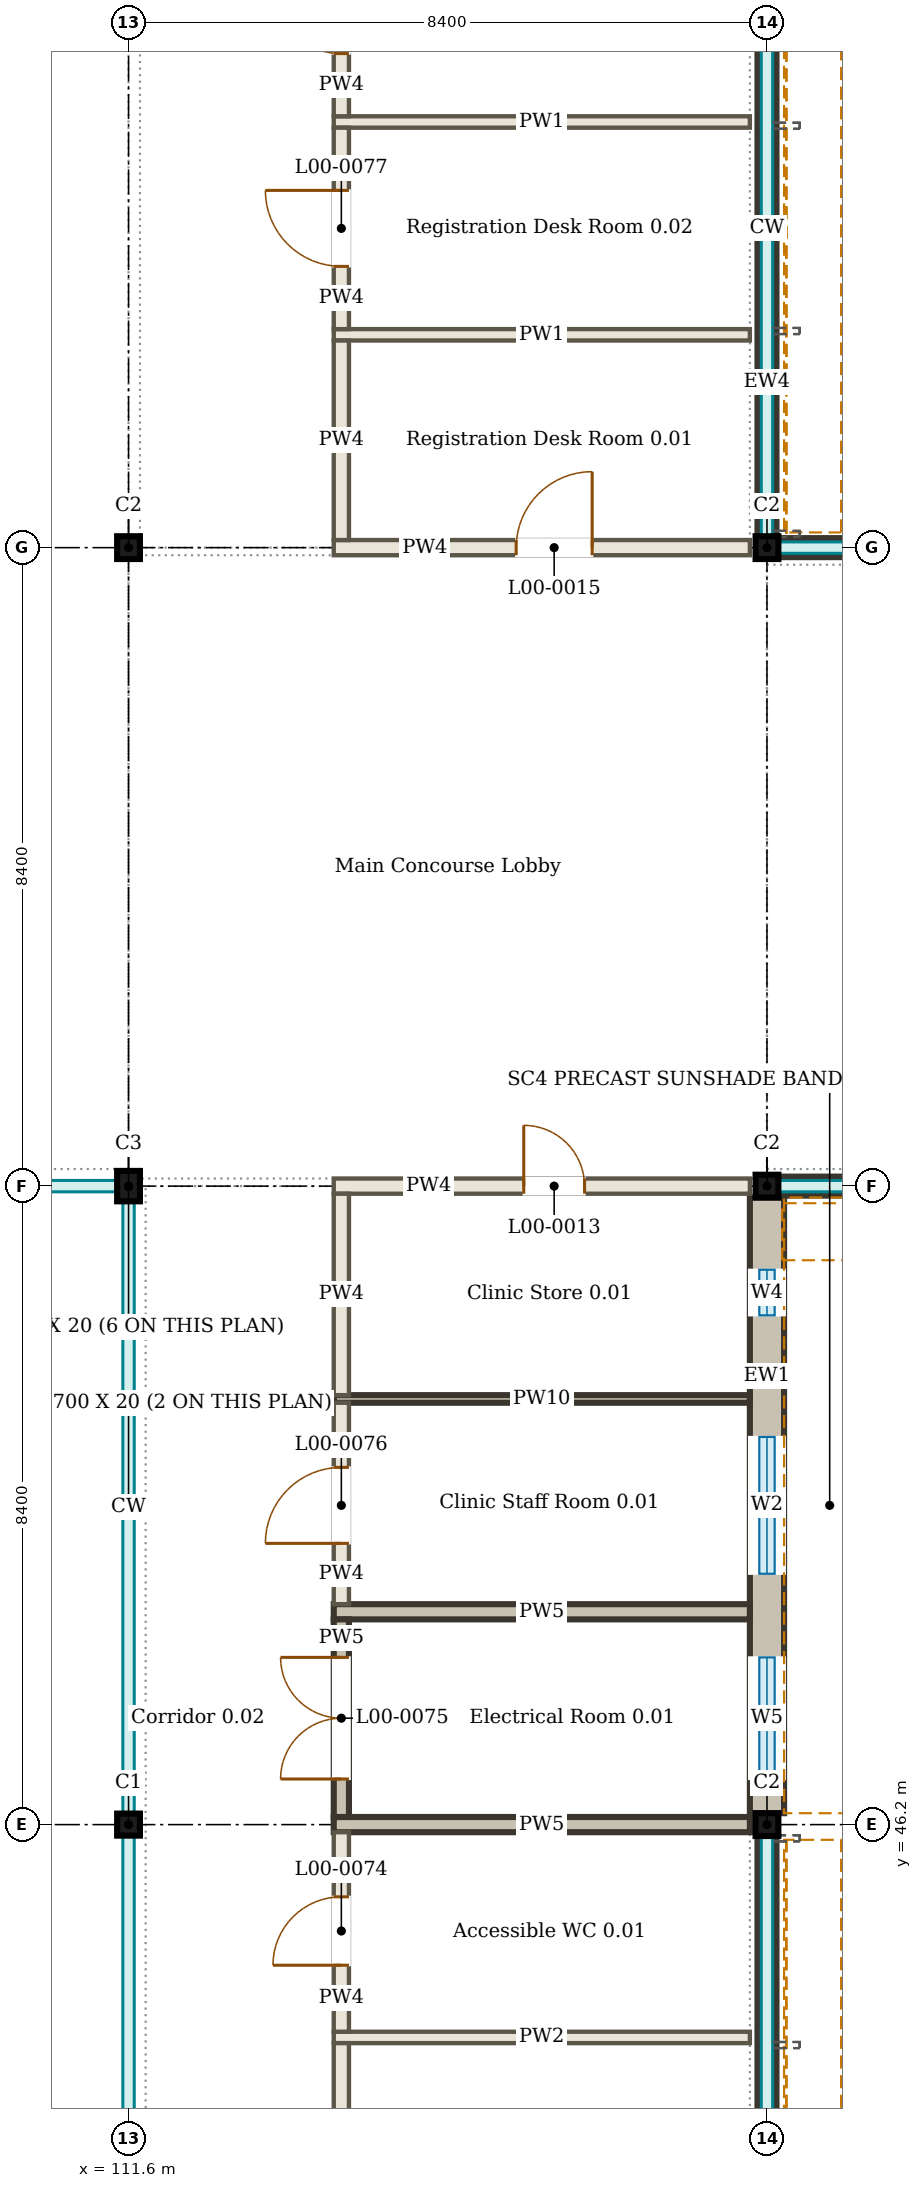
"""IFC4 building model, lengths in metres.
Left out: names, types, materials, properties, quantities, classifications, styles, units other than length and angle.
Written with IfcOpenShell. Run it as: python <this file> out.ifc"""

import sys

from ifc_helpers import new_model, si_unit, direction, frame, frame_2d, origin, origin_2d, place, context, subcontext, project, spatial, rectangle, i_section, extrude, element, fill, save


model = new_model("IFC4")
c1 = context("Model", 3, precision=1e-05, world=origin(), true_north=direction((0.0, 1.0)))
c2 = subcontext(c1, "Body", "Model", "MODEL_VIEW")
j1 = project(units=[si_unit("LENGTHUNIT", "METRE"), si_unit("PLANEANGLEUNIT", "RADIAN")], contexts=[c1])
p1 = place(None, origin())
s1 = spatial("IfcSite", under=j1, at=p1, CompositionType="ELEMENT")
p2 = place(p1, origin())
s2 = spatial("IfcBuilding", under=s1, at=p2, CompositionType="ELEMENT")
p3 = place(p2, origin())
s3 = spatial("IfcBuildingStorey", under=s2, at=p3, CompositionType="ELEMENT", Elevation=0.0)
p4 = place(p3, frame((111.6, 46.2, 0.0), z_axis=(0.0, 0.0, 1.0), x_axis=(1.0, 0.0, 0.0)))
e1 = element("IfcColumn", 1, at=p4, inside=s3, PredefinedType="COLUMN", context=c2, shape_type="SweptSolid", body=[
    extrude(i_section(OverallWidth=0.3, OverallDepth=0.29, WebThickness=0.009, FlangeThickness=0.014, FilletRadius=0.027, at=origin_2d()), origin(), (0.0, 0.0, 1.0), 4.5),
])
p5 = place(p3, frame((120.0, 46.2, 0.0), z_axis=(0.0, 0.0, 1.0), x_axis=(1.0, 0.0, 0.0)))
e2 = element("IfcColumn", 2, at=p5, inside=s3, PredefinedType="COLUMN", context=c2, shape_type="SweptSolid", body=[
    extrude(i_section(OverallWidth=0.3, OverallDepth=0.3, WebThickness=0.011, FlangeThickness=0.019, FilletRadius=0.027, at=origin_2d()), origin(), (0.0, 0.0, 1.0), 4.5),
])
p6 = place(p3, frame((111.6, 54.6, 0.0), z_axis=(0.0, 0.0, 1.0), x_axis=(1.0, 0.0, 0.0)))
e3 = element("IfcColumn", 3, at=p6, inside=s3, PredefinedType="COLUMN", context=c2, shape_type="SweptSolid", body=[
    extrude(i_section(OverallWidth=0.3, OverallDepth=0.4, WebThickness=0.013, FlangeThickness=0.024, FilletRadius=0.027, at=origin_2d()), origin(), (0.0, 0.0, 1.0), 4.5),
])
for number, where, z_axis, x_axis in (
    (4, (120.0, 54.6, 0.0), (0.0, 0.0, 1.0), (1.0, 0.0, 0.0)),
    (5, (111.6, 63.0, 0.0), (0.0, 0.0, 1.0), (1.0, 0.0, 0.0)),
    (6, (120.0, 63.0, 0.0), (0.0, 0.0, 1.0), (1.0, 0.0, 0.0)),
):
    element("IfcColumn", number, at=place(p3, frame(where, z_axis=z_axis, x_axis=x_axis)), inside=s3, PredefinedType="COLUMN", context=c2, shape_type="SweptSolid", body=[
        extrude(i_section(OverallWidth=0.3, OverallDepth=0.3, WebThickness=0.011, FlangeThickness=0.019, FilletRadius=0.027, at=origin_2d()), origin(), (0.0, 0.0, 1.0), 4.5),
    ])
p7 = place(p3, frame((120.0, 37.8, 0.0), z_axis=(0.0, 0.0, 1.0), x_axis=(0.0, 1.0, 0.0)))
e7 = element("IfcWall", 7, at=p7, inside=s3, PredefinedType="SOLIDWALL", context=c2, shape_type="SweptSolid", body=[
    extrude(rectangle(XDim=8.25, YDim=0.25, at=frame_2d((4.125, 0.0))), origin(), (0.0, 0.0, 1.0), 0.45),
])
p8 = place(p3, frame((120.16, 37.8, 3.82), z_axis=(0.0, 0.0, 1.0), x_axis=(0.0, 1.0, 0.0)))
e8 = element("IfcWall", 8, at=p8, inside=s3, PredefinedType="SOLIDWALL", context=c2, shape_type="SweptSolid", body=[
    extrude(rectangle(XDim=8.25, YDim=0.13, at=frame_2d((4.125, 0.0))), origin(), (0.0, 0.0, 1.0), 0.68),
])
p9 = place(p3, frame((120.0, 46.35, 0.0), z_axis=(0.0, 0.0, 1.0), x_axis=(0.0, 1.0, 0.0)))
e9 = element("IfcWall", 9, at=p9, inside=s3, PredefinedType="SOLIDWALL", context=c2, shape_type="SweptSolid", body=[
    extrude(rectangle(XDim=8.1, YDim=0.45, at=frame_2d((4.05, 0.0))), origin(), (0.0, 0.0, 1.0), 3.8),
])
p10 = place(p9, frame((0.45, 0.0, 0.9)))
e10 = element("IfcOpeningElement", 10, at=p10, cuts=e9, PredefinedType="OPENING", context=c2, shape_type="SweptSolid", body=[
    extrude(rectangle(XDim=1.6, YDim=1.2, at=frame_2d((0.8, 0.6))), frame((0.0, 0.235, 0.0), z_axis=(0.0, -1.0, 0.0), x_axis=(1.0, 0.0, 0.0)), (0.0, 0.0, 1.0), 0.47),
])
p11 = place(p9, frame((3.15, 0.0, 0.6)))
e11 = element("IfcOpeningElement", 11, at=p11, cuts=e9, PredefinedType="OPENING", context=c2, shape_type="SweptSolid", body=[
    extrude(rectangle(XDim=1.8, YDim=2.4, at=frame_2d((0.9, 1.2))), frame((0.0, 0.235, 0.0), z_axis=(0.0, -1.0, 0.0), x_axis=(1.0, 0.0, 0.0)), (0.0, 0.0, 1.0), 0.47),
])
p12 = place(p9, frame((6.55, 0.0, 2.1)))
e12 = element("IfcOpeningElement", 12, at=p12, cuts=e9, PredefinedType="OPENING", context=c2, shape_type="SweptSolid", body=[
    extrude(rectangle(XDim=0.6, YDim=1.2, at=frame_2d((0.3, 0.6))), frame((0.0, 0.235, 0.0), z_axis=(0.0, -1.0, 0.0), x_axis=(1.0, 0.0, 0.0)), (0.0, 0.0, 1.0), 0.47),
])
p13 = place(p3, frame((120.16, 46.35, 3.82), z_axis=(0.0, 0.0, 1.0), x_axis=(0.0, 1.0, 0.0)))
e13 = element("IfcWall", 13, at=p13, inside=s3, PredefinedType="SOLIDWALL", context=c2, shape_type="SweptSolid", body=[
    extrude(rectangle(XDim=8.1, YDim=0.13, at=frame_2d((4.05, 0.0))), origin(), (0.0, 0.0, 1.0), 0.68),
])
p14 = place(p3, frame((120.0, 63.15, 0.0), z_axis=(0.0, 0.0, 1.0), x_axis=(0.0, 1.0, 0.0)))
e14 = element("IfcWall", 14, at=p14, inside=s3, PredefinedType="SOLIDWALL", context=c2, shape_type="SweptSolid", body=[
    extrude(rectangle(XDim=8.1, YDim=0.25, at=frame_2d((4.05, 0.0))), origin(), (0.0, 0.0, 1.0), 0.45),
])
p15 = place(p3, frame((120.16, 63.15, 3.82), z_axis=(0.0, 0.0, 1.0), x_axis=(0.0, 1.0, 0.0)))
e15 = element("IfcWall", 15, at=p15, inside=s3, PredefinedType="SOLIDWALL", context=c2, shape_type="SweptSolid", body=[
    extrude(rectangle(XDim=8.1, YDim=0.13, at=frame_2d((4.05, 0.0))), origin(), (0.0, 0.0, 1.0), 0.68),
])
p16 = place(p3, frame((120.15, 63.0, 0.0), z_axis=(0.0, 0.0, 1.0), x_axis=(1.0, 0.0, 0.0)))
e16 = element("IfcWall", 16, at=p16, inside=s3, PredefinedType="SOLIDWALL", context=c2, shape_type="SweptSolid", body=[
    extrude(rectangle(XDim=8.1, YDim=0.25, at=frame_2d((4.05, 0.0))), origin(), (0.0, 0.0, 1.0), 0.45),
])
p17 = place(p3, frame((120.15, 63.16, 3.82), z_axis=(0.0, 0.0, 1.0), x_axis=(1.0, 0.0, 0.0)))
e17 = element("IfcWall", 17, at=p17, inside=s3, PredefinedType="SOLIDWALL", context=c2, shape_type="SweptSolid", body=[
    extrude(rectangle(XDim=8.1, YDim=0.13, at=frame_2d((4.05, 0.0))), origin(), (0.0, 0.0, 1.0), 0.68),
])
p18 = place(p3, frame((120.15, 54.6, 0.0), z_axis=(0.0, 0.0, 1.0), x_axis=(1.0, 0.0, 0.0)))
e18 = element("IfcWall", 18, at=p18, inside=s3, PredefinedType="SOLIDWALL", context=c2, shape_type="SweptSolid", body=[
    extrude(rectangle(XDim=8.1, YDim=0.25, at=frame_2d((4.05, 0.0))), origin(), (0.0, 0.0, 1.0), 0.45),
])
p19 = place(p3, frame((120.15, 54.44, 3.82), z_axis=(0.0, 0.0, 1.0), x_axis=(1.0, 0.0, 0.0)))
e19 = element("IfcWall", 19, at=p19, inside=s3, PredefinedType="SOLIDWALL", context=c2, shape_type="SweptSolid", body=[
    extrude(rectangle(XDim=8.1, YDim=0.13, at=frame_2d((4.05, 0.0))), origin(), (0.0, 0.0, 1.0), 0.68),
])
p20 = place(p3, frame((114.3, 43.4, 0.0), z_axis=(0.0, 0.0, 1.0), x_axis=(1.0, 0.0, 0.0)))
e20 = element("IfcWall", 20, at=p20, inside=s3, PredefinedType="PARTITIONING", context=c2, shape_type="SweptSolid", body=[
    extrude(rectangle(XDim=5.475, YDim=0.15, at=frame_2d((2.737, 0.0))), origin(), (0.0, 0.0, 1.0), 3.95),
])
p21 = place(p3, frame((114.3, 46.2, 0.0), z_axis=(0.0, 0.0, 1.0), x_axis=(1.0, 0.0, 0.0)))
e21 = element("IfcWall", 21, at=p21, inside=s3, PredefinedType="SOLIDWALL", context=c2, shape_type="SweptSolid", body=[
    extrude(rectangle(XDim=5.475, YDim=0.2, at=frame_2d((2.737, 0.0))), origin(), (0.0, 0.0, 1.0), 3.8),
])
p22 = place(p3, frame((114.3, 49.0, 0.0), z_axis=(0.0, 0.0, 1.0), x_axis=(1.0, 0.0, 0.0)))
e22 = element("IfcWall", 22, at=p22, inside=s3, PredefinedType="SOLIDWALL", context=c2, shape_type="SweptSolid", body=[
    extrude(rectangle(XDim=5.475, YDim=0.2, at=frame_2d((2.737, 0.0))), origin(), (0.0, 0.0, 1.0), 3.95),
])
p23 = place(p3, frame((114.3, 51.8, 0.0), z_axis=(0.0, 0.0, 1.0), x_axis=(1.0, 0.0, 0.0)))
e23 = element("IfcWall", 23, at=p23, inside=s3, PredefinedType="SOLIDWALL", context=c2, shape_type="SweptSolid", body=[
    extrude(rectangle(XDim=5.475, YDim=0.1, at=frame_2d((2.737, 0.0))), origin(), (0.0, 0.0, 1.0), 3.95),
])
p24 = place(p3, frame((114.3, 54.6, 0.0), z_axis=(0.0, 0.0, 1.0), x_axis=(1.0, 0.0, 0.0)))
e24 = element("IfcWall", 24, at=p24, inside=s3, PredefinedType="PARTITIONING", context=c2, shape_type="SweptSolid", body=[
    extrude(rectangle(XDim=5.475, YDim=0.2, at=frame_2d((2.737, 0.0))), origin(), (0.0, 0.0, 1.0), 3.8),
])
p25 = place(p24, frame((2.5, 0.0, 0.0)))
e25 = element("IfcOpeningElement", 25, at=p25, cuts=e24, PredefinedType="OPENING", context=c2, shape_type="SweptSolid", body=[
    extrude(rectangle(XDim=0.8, YDim=2.1, at=frame_2d((0.4, 1.05))), frame((0.0, 0.11, 0.0), z_axis=(0.0, -1.0, 0.0), x_axis=(1.0, 0.0, 0.0)), (0.0, 0.0, 1.0), 0.22),
])
p26 = place(p3, frame((114.3, 63.0, 0.0), z_axis=(0.0, 0.0, 1.0), x_axis=(1.0, 0.0, 0.0)))
e26 = element("IfcWall", 26, at=p26, inside=s3, PredefinedType="PARTITIONING", context=c2, shape_type="SweptSolid", body=[
    extrude(rectangle(XDim=5.475, YDim=0.2, at=frame_2d((2.737, 0.0))), origin(), (0.0, 0.0, 1.0), 3.8),
])
p27 = place(p26, frame((2.4, 0.0, 0.0)))
e27 = element("IfcOpeningElement", 27, at=p27, cuts=e26, PredefinedType="OPENING", context=c2, shape_type="SweptSolid", body=[
    extrude(rectangle(XDim=1.0, YDim=2.1, at=frame_2d((0.5, 1.05))), frame((0.0, 0.11, 0.0), z_axis=(0.0, -1.0, 0.0), x_axis=(1.0, 0.0, 0.0)), (0.0, 0.0, 1.0), 0.22),
])
for number, where, z_axis, x_axis in (
    (28, (114.3, 65.8, 0.0), (0.0, 0.0, 1.0), (1.0, 0.0, 0.0)),
    (29, (114.3, 68.6, 0.0), (0.0, 0.0, 1.0), (1.0, 0.0, 0.0)),
):
    element("IfcWall", number, at=place(p3, frame(where, z_axis=z_axis, x_axis=x_axis)), inside=s3, PredefinedType="PARTITIONING", context=c2, shape_type="SweptSolid", body=[
        extrude(rectangle(XDim=5.475, YDim=0.15, at=frame_2d((2.737, 0.0))), origin(), (0.0, 0.0, 1.0), 3.95),
    ])
p28 = place(p3, frame((114.4, 40.7, 0.0), z_axis=(0.0, 0.0, 1.0), x_axis=(0.0, 1.0, 0.0)))
e30 = element("IfcWall", 30, at=p28, inside=s3, PredefinedType="PARTITIONING", context=c2, shape_type="SweptSolid", body=[
    extrude(rectangle(XDim=2.625, YDim=0.2, at=frame_2d((1.312, 0.0))), origin(), (0.0, 0.0, 1.0), 3.95),
])
p29 = place(p3, frame((114.4, 43.475, 0.0), z_axis=(0.0, 0.0, 1.0), x_axis=(0.0, 1.0, 0.0)))
e31 = element("IfcWall", 31, at=p29, inside=s3, PredefinedType="PARTITIONING", context=c2, shape_type="SweptSolid", body=[
    extrude(rectangle(XDim=2.625, YDim=0.2, at=frame_2d((1.312, 0.0))), origin(), (0.0, 0.0, 1.0), 3.8),
])
p30 = place(p29, frame((0.875, 0.0, 0.0)))
e32 = element("IfcOpeningElement", 32, at=p30, cuts=e31, PredefinedType="OPENING", context=c2, shape_type="SweptSolid", body=[
    extrude(rectangle(XDim=0.9, YDim=2.1, at=frame_2d((0.45, 1.05))), frame((0.0, 0.11, 0.0), z_axis=(0.0, -1.0, 0.0), x_axis=(1.0, 0.0, 0.0)), (0.0, 0.0, 1.0), 0.22),
])
p31 = place(p3, frame((114.4, 46.3, 0.0), z_axis=(0.0, 0.0, 1.0), x_axis=(0.0, 1.0, 0.0)))
e33 = element("IfcWall", 33, at=p31, inside=s3, PredefinedType="SOLIDWALL", context=c2, shape_type="SweptSolid", body=[
    extrude(rectangle(XDim=2.6, YDim=0.2, at=frame_2d((1.3, 0.0))), origin(), (0.0, 0.0, 1.0), 3.8),
])
p32 = place(p31, frame((0.5, 0.0, 0.0)))
e34 = element("IfcOpeningElement", 34, at=p32, cuts=e33, PredefinedType="OPENING", context=c2, shape_type="SweptSolid", body=[
    extrude(rectangle(XDim=1.6, YDim=2.1, at=frame_2d((0.8, 1.05))), frame((0.0, 0.11, 0.0), z_axis=(0.0, -1.0, 0.0), x_axis=(1.0, 0.0, 0.0)), (0.0, 0.0, 1.0), 0.22),
])
p33 = place(p3, frame((114.4, 49.1, 0.0), z_axis=(0.0, 0.0, 1.0), x_axis=(0.0, 1.0, 0.0)))
e35 = element("IfcWall", 35, at=p33, inside=s3, PredefinedType="PARTITIONING", context=c2, shape_type="SweptSolid", body=[
    extrude(rectangle(XDim=2.65, YDim=0.2, at=frame_2d((1.325, 0.0))), origin(), (0.0, 0.0, 1.0), 3.95),
])
p34 = place(p33, frame((0.8, 0.0, 0.0)))
e36 = element("IfcOpeningElement", 36, at=p34, cuts=e35, PredefinedType="OPENING", context=c2, shape_type="SweptSolid", body=[
    extrude(rectangle(XDim=1.0, YDim=2.1, at=frame_2d((0.5, 1.05))), frame((0.0, 0.11, 0.0), z_axis=(0.0, -1.0, 0.0), x_axis=(1.0, 0.0, 0.0)), (0.0, 0.0, 1.0), 0.22),
])
p35 = place(p3, frame((114.4, 51.85, 0.0), z_axis=(0.0, 0.0, 1.0), x_axis=(0.0, 1.0, 0.0)))
e37 = element("IfcWall", 37, at=p35, inside=s3, PredefinedType="PARTITIONING", context=c2, shape_type="SweptSolid", body=[
    extrude(rectangle(XDim=2.65, YDim=0.2, at=frame_2d((1.325, 0.0))), origin(), (0.0, 0.0, 1.0), 3.8),
])
p36 = place(p3, frame((114.4, 63.1, 0.0), z_axis=(0.0, 0.0, 1.0), x_axis=(0.0, 1.0, 0.0)))
e38 = element("IfcWall", 38, at=p36, inside=s3, PredefinedType="PARTITIONING", context=c2, shape_type="SweptSolid", body=[
    extrude(rectangle(XDim=2.625, YDim=0.2, at=frame_2d((1.312, 0.0))), origin(), (0.0, 0.0, 1.0), 3.8),
])
p37 = place(p3, frame((114.4, 65.875, 0.0), z_axis=(0.0, 0.0, 1.0), x_axis=(0.0, 1.0, 0.0)))
e39 = element("IfcWall", 39, at=p37, inside=s3, PredefinedType="PARTITIONING", context=c2, shape_type="SweptSolid", body=[
    extrude(rectangle(XDim=2.65, YDim=0.2, at=frame_2d((1.325, 0.0))), origin(), (0.0, 0.0, 1.0), 3.95),
])
p38 = place(p37, frame((0.825, 0.0, 0.0)))
e40 = element("IfcOpeningElement", 40, at=p38, cuts=e39, PredefinedType="OPENING", context=c2, shape_type="SweptSolid", body=[
    extrude(rectangle(XDim=1.0, YDim=2.1, at=frame_2d((0.5, 1.05))), frame((0.0, 0.11, 0.0), z_axis=(0.0, -1.0, 0.0), x_axis=(1.0, 0.0, 0.0)), (0.0, 0.0, 1.0), 0.22),
])
p39 = place(p3, frame((114.4, 68.675, 0.0), z_axis=(0.0, 0.0, 1.0), x_axis=(0.0, 1.0, 0.0)))
e41 = element("IfcWall", 41, at=p39, inside=s3, PredefinedType="PARTITIONING", context=c2, shape_type="SweptSolid", body=[
    extrude(rectangle(XDim=2.65, YDim=0.2, at=frame_2d((1.325, 0.0))), origin(), (0.0, 0.0, 1.0), 3.8),
])
p40 = place(p39, frame((0.825, 0.0, 0.0)))
e42 = element("IfcOpeningElement", 42, at=p40, cuts=e41, PredefinedType="OPENING", context=c2, shape_type="SweptSolid", body=[
    extrude(rectangle(XDim=1.0, YDim=2.1, at=frame_2d((0.5, 1.05))), frame((0.0, 0.11, 0.0), z_axis=(0.0, -1.0, 0.0), x_axis=(1.0, 0.0, 0.0)), (0.0, 0.0, 1.0), 0.22),
])
p41 = place(p10, origin())
e43 = element("IfcWindow", 43, at=p41, inside=s3, PartitioningType="SINGLE_PANEL", PredefinedType="WINDOW", context=c2, shape_type="SweptSolid", body=[
    extrude(rectangle(XDim=1.6, YDim=1.2, at=frame_2d((0.8, 0.6))), frame((0.0, 0.03, 0.0), z_axis=(0.0, -1.0, 0.0), x_axis=(1.0, 0.0, 0.0)), (0.0, 0.0, 1.0), 0.06),
])
fill(e10, e43)
p42 = place(p11, origin())
e44 = element("IfcWindow", 44, at=p42, inside=s3, PartitioningType="SINGLE_PANEL", PredefinedType="WINDOW", context=c2, shape_type="SweptSolid", body=[
    extrude(rectangle(XDim=1.8, YDim=2.4, at=frame_2d((0.9, 1.2))), frame((0.0, 0.03, 0.0), z_axis=(0.0, -1.0, 0.0), x_axis=(1.0, 0.0, 0.0)), (0.0, 0.0, 1.0), 0.06),
])
fill(e11, e44)
p43 = place(p12, origin())
e45 = element("IfcWindow", 45, at=p43, inside=s3, PartitioningType="SINGLE_PANEL", PredefinedType="WINDOW", context=c2, shape_type="SweptSolid", body=[
    extrude(rectangle(XDim=0.6, YDim=1.2, at=frame_2d((0.3, 0.6))), frame((0.0, 0.135, 0.0), z_axis=(0.0, -1.0, 0.0), x_axis=(1.0, 0.0, 0.0)), (0.0, 0.0, 1.0), 0.06),
])
fill(e12, e45)
p44 = place(p25, origin())
e46 = element("IfcDoor", 46, at=p44, inside=s3, OperationType="SINGLE_SWING_LEFT", PredefinedType="DOOR", context=c2, shape_type="SweptSolid", body=[
    extrude(rectangle(XDim=0.8, YDim=2.1, at=frame_2d((0.4, 1.05))), frame((0.0, 0.025, 0.0), z_axis=(0.0, -1.0, 0.0), x_axis=(1.0, 0.0, 0.0)), (0.0, 0.0, 1.0), 0.05),
])
fill(e25, e46)
p45 = place(p27, origin())
e47 = element("IfcDoor", 47, at=p45, inside=s3, OperationType="SINGLE_SWING_RIGHT", PredefinedType="DOOR", context=c2, shape_type="SweptSolid", body=[
    extrude(rectangle(XDim=1.0, YDim=2.1, at=frame_2d((0.5, 1.05))), frame((0.0, 0.025, 0.0), z_axis=(0.0, -1.0, 0.0), x_axis=(1.0, 0.0, 0.0)), (0.0, 0.0, 1.0), 0.05),
])
fill(e27, e47)
p46 = place(p30, origin())
e48 = element("IfcDoor", 48, at=p46, inside=s3, OperationType="SINGLE_SWING_LEFT", PredefinedType="DOOR", context=c2, shape_type="SweptSolid", body=[
    extrude(rectangle(XDim=0.9, YDim=2.1, at=frame_2d((0.45, 1.05))), frame((0.0, 0.025, 0.0), z_axis=(0.0, -1.0, 0.0), x_axis=(1.0, 0.0, 0.0)), (0.0, 0.0, 1.0), 0.05),
])
fill(e32, e48)
p47 = place(p32, origin())
e49 = element("IfcDoor", 49, at=p47, inside=s3, OperationType="DOUBLE_DOOR_SINGLE_SWING", PredefinedType="DOOR", context=c2, shape_type="SweptSolid", body=[
    extrude(rectangle(XDim=1.6, YDim=2.1, at=frame_2d((0.8, 1.05))), frame((0.0, 0.025, 0.0), z_axis=(0.0, -1.0, 0.0), x_axis=(1.0, 0.0, 0.0)), (0.0, 0.0, 1.0), 0.05),
])
fill(e34, e49)
p48 = place(p34, origin())
e50 = element("IfcDoor", 50, at=p48, inside=s3, OperationType="SINGLE_SWING_LEFT", PredefinedType="DOOR", context=c2, shape_type="SweptSolid", body=[
    extrude(rectangle(XDim=1.0, YDim=2.1, at=frame_2d((0.5, 1.05))), frame((0.0, 0.025, 0.0), z_axis=(0.0, -1.0, 0.0), x_axis=(1.0, 0.0, 0.0)), (0.0, 0.0, 1.0), 0.05),
])
fill(e36, e50)
p49 = place(p38, origin())
e51 = element("IfcDoor", 51, at=p49, inside=s3, OperationType="SINGLE_SWING_RIGHT", PredefinedType="DOOR", context=c2, shape_type="SweptSolid", body=[
    extrude(rectangle(XDim=1.0, YDim=2.1, at=frame_2d((0.5, 1.05))), frame((0.0, 0.025, 0.0), z_axis=(0.0, -1.0, 0.0), x_axis=(1.0, 0.0, 0.0)), (0.0, 0.0, 1.0), 0.05),
])
fill(e40, e51)
p50 = place(p40, origin())
e52 = element("IfcDoor", 52, at=p50, inside=s3, OperationType="SINGLE_SWING_RIGHT", PredefinedType="DOOR", context=c2, shape_type="SweptSolid", body=[
    extrude(rectangle(XDim=1.0, YDim=2.1, at=frame_2d((0.5, 1.05))), frame((0.0, 0.025, 0.0), z_axis=(0.0, -1.0, 0.0), x_axis=(1.0, 0.0, 0.0)), (0.0, 0.0, 1.0), 0.05),
])
fill(e42, e52)
save(model, sys.argv[1])
